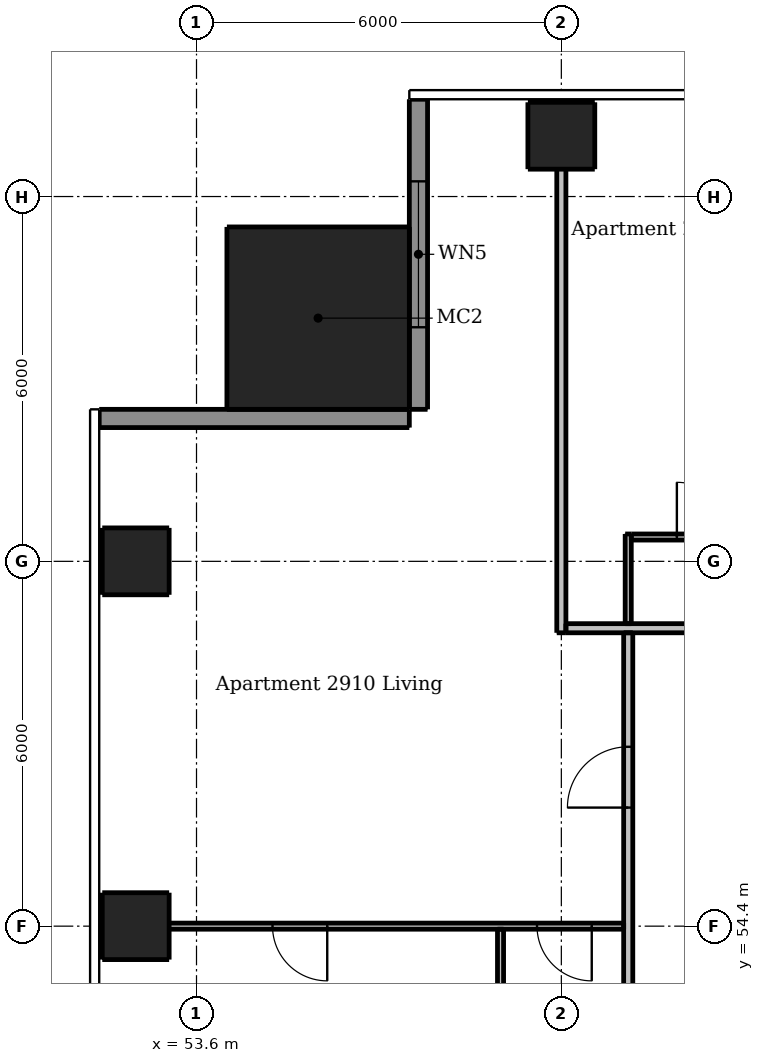
"""IFC4 building model, lengths in metres.
Left out: names, types, materials, properties, quantities, classifications, styles, units other than length and angle.
Written with IfcOpenShell. Run it as: python <this file> out.ifc"""

import sys

from ifc_helpers import new_model, si_unit, direction, frame, frame_2d, origin, origin_2d, place, context, subcontext, project, spatial, rectangle, extrude, element, fill, save


model = new_model("IFC4")
c1 = context("Model", 3, precision=1e-05, world=origin(), true_north=direction((0.0, 1.0)))
c2 = subcontext(c1, "Body", "Model", "MODEL_VIEW")
j1 = project(units=[si_unit("LENGTHUNIT", "METRE"), si_unit("PLANEANGLEUNIT", "RADIAN")], contexts=[c1])
p1 = place(None, origin())
s1 = spatial("IfcSite", under=j1, at=p1, CompositionType="ELEMENT")
p2 = place(p1, origin())
s2 = spatial("IfcBuilding", under=s1, at=p2, CompositionType="ELEMENT")
p3 = place(p2, frame((0.0, 0.0, 108.4)))
s3 = spatial("IfcBuildingStorey", under=s2, at=p3, CompositionType="ELEMENT", Elevation=108.4)
for number, where, z_axis, x_axis in (
    (1, (59.6, 67.4, 0.0), (0.0, 0.0, 1.0), (1.0, 0.0, 0.0)),
    (2, (52.6, 54.4, 0.0), (0.0, 0.0, 1.0), (1.0, 0.0, 0.0)),
    (3, (52.6, 60.4, 0.0), (0.0, 0.0, 1.0), (1.0, 0.0, 0.0)),
):
    element("IfcColumn", number, at=place(p3, frame(where, z_axis=z_axis, x_axis=x_axis)), inside=s3, PredefinedType="COLUMN", context=c2, shape_type="SweptSolid", body=[
        extrude(rectangle(XDim=1.1, YDim=1.1, at=origin_2d()), origin(), (0.0, 0.0, 1.0), 3.05),
    ])
p4 = place(p3, frame((55.6, 64.4, 0.0), z_axis=(0.0, 0.0, 1.0), x_axis=(1.0, 0.0, 0.0)))
e4 = element("IfcColumn", 4, at=p4, inside=s3, PredefinedType="COLUMN", context=c2, shape_type="SweptSolid", body=[
    extrude(rectangle(XDim=3.0, YDim=3.0, at=origin_2d()), origin(), (0.0, 0.0, 1.0), 3.3),
])
p5 = place(p3, frame((57.25, 68.0, 0.0), z_axis=(0.0, 0.0, 1.0), x_axis=(0.0, -1.0, 0.0)))
e5 = element("IfcWall", 5, at=p5, inside=s3, PredefinedType="SOLIDWALL", context=c2, shape_type="SweptSolid", body=[
    extrude(rectangle(XDim=5.1, YDim=0.3, at=frame_2d((2.55, 0.0))), origin(), (0.0, 0.0, 1.0), 3.05),
])
p6 = place(p5, frame((1.35, 0.0, 0.15)))
e6 = element("IfcOpeningElement", 6, at=p6, cuts=e5, PredefinedType="OPENING", context=c2, shape_type="SweptSolid", body=[
    extrude(rectangle(XDim=2.4, YDim=2.1, at=frame_2d((1.2, 1.05))), frame((0.0, 0.16, 0.0), z_axis=(0.0, -1.0, 0.0), x_axis=(1.0, 0.0, 0.0)), (0.0, 0.0, 1.0), 0.32),
])
p7 = place(p3, frame((57.1, 62.75, 0.0), z_axis=(0.0, 0.0, 1.0), x_axis=(-1.0, 0.0, 0.0)))
e7 = element("IfcWall", 7, at=p7, inside=s3, PredefinedType="SOLIDWALL", context=c2, shape_type="SweptSolid", body=[
    extrude(rectangle(XDim=5.1, YDim=0.3, at=frame_2d((2.55, 0.0))), origin(), (0.0, 0.0, 1.0), 3.05),
])
p8 = place(p3, frame((58.6, 54.35, 0.0), z_axis=(0.0, 0.0, 1.0), x_axis=(0.0, -1.0, 0.0)))
e8 = element("IfcWall", 8, at=p8, inside=s3, PredefinedType="PARTITIONING", context=c2, shape_type="SweptSolid", body=[
    extrude(rectangle(XDim=5.875, YDim=0.1, at=frame_2d((2.938, 0.0))), origin(), (0.0, 0.0, 1.0), 3.05),
])
p9 = place(p8, frame((3.75, 0.0, 0.0)))
e9 = element("IfcOpeningElement", 9, at=p9, cuts=e8, PredefinedType="OPENING", context=c2, shape_type="SweptSolid", body=[
    extrude(rectangle(XDim=0.8, YDim=2.1, at=frame_2d((0.4, 1.05))), frame((0.0, 0.06, 0.0), z_axis=(0.0, -1.0, 0.0), x_axis=(1.0, 0.0, 0.0)), (0.0, 0.0, 1.0), 0.12),
])
p10 = place(p3, frame((60.7, 59.375, 0.0), z_axis=(0.0, 0.0, 1.0), x_axis=(0.0, 1.0, 0.0)))
e10 = element("IfcWall", 10, at=p10, inside=s3, PredefinedType="PARTITIONING", context=c2, shape_type="SweptSolid", body=[
    extrude(rectangle(XDim=1.475, YDim=0.1, at=frame_2d((0.738, 0.0))), origin(), (0.0, 0.0, 1.0), 3.05),
])
p11 = place(p3, frame((60.75, 60.8, 0.0), z_axis=(0.0, 0.0, 1.0), x_axis=(1.0, 0.0, 0.0)))
e11 = element("IfcWall", 11, at=p11, inside=s3, PredefinedType="PARTITIONING", context=c2, shape_type="SweptSolid", body=[
    extrude(rectangle(XDim=16.775, YDim=0.1, at=frame_2d((8.387, 0.0))), origin(), (0.0, 0.0, 1.0), 3.05),
])
p12 = place(p11, frame((6.2, 0.0, 0.0)))
e12 = element("IfcOpeningElement", 12, at=p12, cuts=e11, PredefinedType="OPENING", context=c2, shape_type="SweptSolid", body=[
    extrude(rectangle(XDim=0.9, YDim=2.1, at=frame_2d((0.45, 1.05))), frame((0.0, 0.06, 0.0), z_axis=(0.0, -1.0, 0.0), x_axis=(1.0, 0.0, 0.0)), (0.0, 0.0, 1.0), 0.12),
])
p13 = place(p11, frame((9.2, 0.0, 0.0)))
e13 = element("IfcOpeningElement", 13, at=p13, cuts=e11, PredefinedType="OPENING", context=c2, shape_type="SweptSolid", body=[
    extrude(rectangle(XDim=0.9, YDim=2.1, at=frame_2d((0.45, 1.05))), frame((0.0, 0.06, 0.0), z_axis=(0.0, -1.0, 0.0), x_axis=(1.0, 0.0, 0.0)), (0.0, 0.0, 1.0), 0.12),
])
p14 = place(p11, frame((0.75, 0.0, 0.0)))
e14 = element("IfcOpeningElement", 14, at=p14, cuts=e11, PredefinedType="OPENING", context=c2, shape_type="SweptSolid", body=[
    extrude(rectangle(XDim=0.9, YDim=2.1, at=frame_2d((0.45, 1.05))), frame((0.0, 0.06, 0.0), z_axis=(0.0, -1.0, 0.0), x_axis=(1.0, 0.0, 0.0)), (0.0, 0.0, 1.0), 0.12),
])
p15 = place(p11, frame((14.6, 0.0, 0.0)))
e15 = element("IfcOpeningElement", 15, at=p15, cuts=e11, PredefinedType="OPENING", context=c2, shape_type="SweptSolid", body=[
    extrude(rectangle(XDim=0.9, YDim=2.1, at=frame_2d((0.45, 1.05))), frame((0.0, 0.06, 0.0), z_axis=(0.0, -1.0, 0.0), x_axis=(1.0, 0.0, 0.0)), (0.0, 0.0, 1.0), 0.12),
])
p16 = place(p11, frame((3.25, 0.0, 0.0)))
e16 = element("IfcOpeningElement", 16, at=p16, cuts=e11, PredefinedType="OPENING", context=c2, shape_type="SweptSolid", body=[
    extrude(rectangle(XDim=0.8, YDim=2.1, at=frame_2d((0.4, 1.05))), frame((0.0, 0.06, 0.0), z_axis=(0.0, -1.0, 0.0), x_axis=(1.0, 0.0, 0.0)), (0.0, 0.0, 1.0), 0.12),
])
p17 = place(p11, frame((11.65, 0.0, 0.0)))
e17 = element("IfcOpeningElement", 17, at=p17, cuts=e11, PredefinedType="OPENING", context=c2, shape_type="SweptSolid", body=[
    extrude(rectangle(XDim=0.8, YDim=2.1, at=frame_2d((0.4, 1.05))), frame((0.0, 0.06, 0.0), z_axis=(0.0, -1.0, 0.0), x_axis=(1.0, 0.0, 0.0)), (0.0, 0.0, 1.0), 0.12),
])
p18 = place(p3, frame((60.625, 54.4, 0.0), z_axis=(0.0, 0.0, 1.0), x_axis=(-1.0, 0.0, 0.0)))
e18 = element("IfcWall", 18, at=p18, inside=s3, PredefinedType="PARTITIONING", context=c2, shape_type="SweptSolid", body=[
    extrude(rectangle(XDim=8.625, YDim=0.1, at=frame_2d((4.312, 0.0))), origin(), (0.0, 0.0, 1.0), 2.516),
])
p19 = place(p18, frame((0.525, 0.0, 0.0)))
e19 = element("IfcOpeningElement", 19, at=p19, cuts=e18, PredefinedType="OPENING", context=c2, shape_type="SweptSolid", body=[
    extrude(rectangle(XDim=0.9, YDim=2.1, at=frame_2d((0.45, 1.05))), frame((0.0, 0.06, 0.0), z_axis=(0.0, -1.0, 0.0), x_axis=(1.0, 0.0, 0.0)), (0.0, 0.0, 1.0), 0.12),
])
p20 = place(p18, frame((4.875, 0.0, 0.0)))
e20 = element("IfcOpeningElement", 20, at=p20, cuts=e18, PredefinedType="OPENING", context=c2, shape_type="SweptSolid", body=[
    extrude(rectangle(XDim=0.9, YDim=2.1, at=frame_2d((0.45, 1.05))), frame((0.0, 0.06, 0.0), z_axis=(0.0, -1.0, 0.0), x_axis=(1.0, 0.0, 0.0)), (0.0, 0.0, 1.0), 0.12),
])
p21 = place(p3, frame((59.6, 59.225, 0.0), z_axis=(0.0, 0.0, 1.0), x_axis=(0.0, 1.0, 0.0)))
e21 = element("IfcWall", 21, at=p21, inside=s3, PredefinedType="PARTITIONING", context=c2, shape_type="SweptSolid", body=[
    extrude(rectangle(XDim=8.775, YDim=0.15, at=frame_2d((4.387, 0.0))), origin(), (0.0, 0.0, 1.0), 2.51),
])
p22 = place(p3, frame((60.7, 30.325, 0.0), z_axis=(0.0, 0.0, 1.0), x_axis=(0.0, 1.0, 0.0)))
e22 = element("IfcWall", 22, at=p22, inside=s3, PredefinedType="PARTITIONING", context=c2, shape_type="SweptSolid", body=[
    extrude(rectangle(XDim=28.9, YDim=0.15, at=frame_2d((14.45, 0.0))), origin(), (0.0, 0.0, 1.0), 3.05),
])
p23 = place(p22, frame((9.225, 0.0, 0.0)))
e23 = element("IfcOpeningElement", 23, at=p23, cuts=e22, PredefinedType="OPENING", context=c2, shape_type="SweptSolid", body=[
    extrude(rectangle(XDim=1.0, YDim=2.1, at=frame_2d((0.5, 1.05))), frame((0.0, 0.085, 0.0), z_axis=(0.0, -1.0, 0.0), x_axis=(1.0, 0.0, 0.0)), (0.0, 0.0, 1.0), 0.17),
])
p24 = place(p22, frame((26.025, 0.0, 0.0)))
e24 = element("IfcOpeningElement", 24, at=p24, cuts=e22, PredefinedType="OPENING", context=c2, shape_type="SweptSolid", body=[
    extrude(rectangle(XDim=1.0, YDim=2.1, at=frame_2d((0.5, 1.05))), frame((0.0, 0.085, 0.0), z_axis=(0.0, -1.0, 0.0), x_axis=(1.0, 0.0, 0.0)), (0.0, 0.0, 1.0), 0.17),
])
p25 = place(p3, frame((59.675, 59.3, 0.0), z_axis=(0.0, 0.0, 1.0), x_axis=(1.0, 0.0, 0.0)))
e25 = element("IfcWall", 25, at=p25, inside=s3, PredefinedType="PARTITIONING", context=c2, shape_type="SweptSolid", body=[
    extrude(rectangle(XDim=28.55, YDim=0.15, at=frame_2d((14.275, 0.0))), origin(), (0.0, 0.0, 1.0), 3.05),
])
p26 = place(p25, frame((8.975, 0.0, 0.0)))
e26 = element("IfcOpeningElement", 26, at=p26, cuts=e25, PredefinedType="OPENING", context=c2, shape_type="SweptSolid", body=[
    extrude(rectangle(XDim=1.0, YDim=2.1, at=frame_2d((0.5, 1.05))), frame((0.0, 0.085, 0.0), z_axis=(0.0, -1.0, 0.0), x_axis=(1.0, 0.0, 0.0)), (0.0, 0.0, 1.0), 0.17),
])
p27 = place(p25, frame((25.775, 0.0, 0.0)))
e27 = element("IfcOpeningElement", 27, at=p27, cuts=e25, PredefinedType="OPENING", context=c2, shape_type="SweptSolid", body=[
    extrude(rectangle(XDim=1.0, YDim=2.1, at=frame_2d((0.5, 1.05))), frame((0.0, 0.085, 0.0), z_axis=(0.0, -1.0, 0.0), x_axis=(1.0, 0.0, 0.0)), (0.0, 0.0, 1.0), 0.17),
])
p28 = place(p6, origin())
e28 = element("IfcWindow", 28, at=p28, inside=s3, PartitioningType="DOUBLE_PANEL_VERTICAL", PredefinedType="WINDOW", context=c2, shape_type="SweptSolid", body=[
    extrude(rectangle(XDim=2.4, YDim=2.1, at=frame_2d((1.2, 1.05))), frame((0.0, 0.03, 0.0), z_axis=(0.0, -1.0, 0.0), x_axis=(1.0, 0.0, 0.0)), (0.0, 0.0, 1.0), 0.06),
])
fill(e6, e28)
p29 = place(p14, origin())
e29 = element("IfcDoor", 29, at=p29, inside=s3, OperationType="SINGLE_SWING_LEFT", PredefinedType="DOOR", context=c2, shape_type="SweptSolid", body=[
    extrude(rectangle(XDim=0.9, YDim=2.1, at=frame_2d((0.45, 1.05))), frame((0.0, 0.025, 0.0), z_axis=(0.0, -1.0, 0.0), x_axis=(1.0, 0.0, 0.0)), (0.0, 0.0, 1.0), 0.05),
])
fill(e14, e29)
p30 = place(p24, origin())
e30 = element("IfcDoor", 30, at=p30, inside=s3, OperationType="SINGLE_SWING_LEFT", PredefinedType="DOOR", context=c2, shape_type="SweptSolid", body=[
    extrude(rectangle(XDim=1.0, YDim=2.1, at=frame_2d((0.5, 1.05))), frame((0.0, 0.025, 0.0), z_axis=(0.0, -1.0, 0.0), x_axis=(1.0, 0.0, 0.0)), (0.0, 0.0, 1.0), 0.05),
])
fill(e24, e30)
p31 = place(p19, origin())
e31 = element("IfcDoor", 31, at=p31, inside=s3, OperationType="SINGLE_SWING_LEFT", PredefinedType="DOOR", context=c2, shape_type="SweptSolid", body=[
    extrude(rectangle(XDim=0.9, YDim=2.1, at=frame_2d((0.45, 1.05))), frame((0.0, 0.025, 0.0), z_axis=(0.0, -1.0, 0.0), x_axis=(1.0, 0.0, 0.0)), (0.0, 0.0, 1.0), 0.05),
])
fill(e19, e31)
p32 = place(p20, origin())
e32 = element("IfcDoor", 32, at=p32, inside=s3, OperationType="SINGLE_SWING_LEFT", PredefinedType="DOOR", context=c2, shape_type="SweptSolid", body=[
    extrude(rectangle(XDim=0.9, YDim=2.1, at=frame_2d((0.45, 1.05))), frame((0.0, 0.025, 0.0), z_axis=(0.0, -1.0, 0.0), x_axis=(1.0, 0.0, 0.0)), (0.0, 0.0, 1.0), 0.05),
])
fill(e20, e32)
save(model, sys.argv[1])
